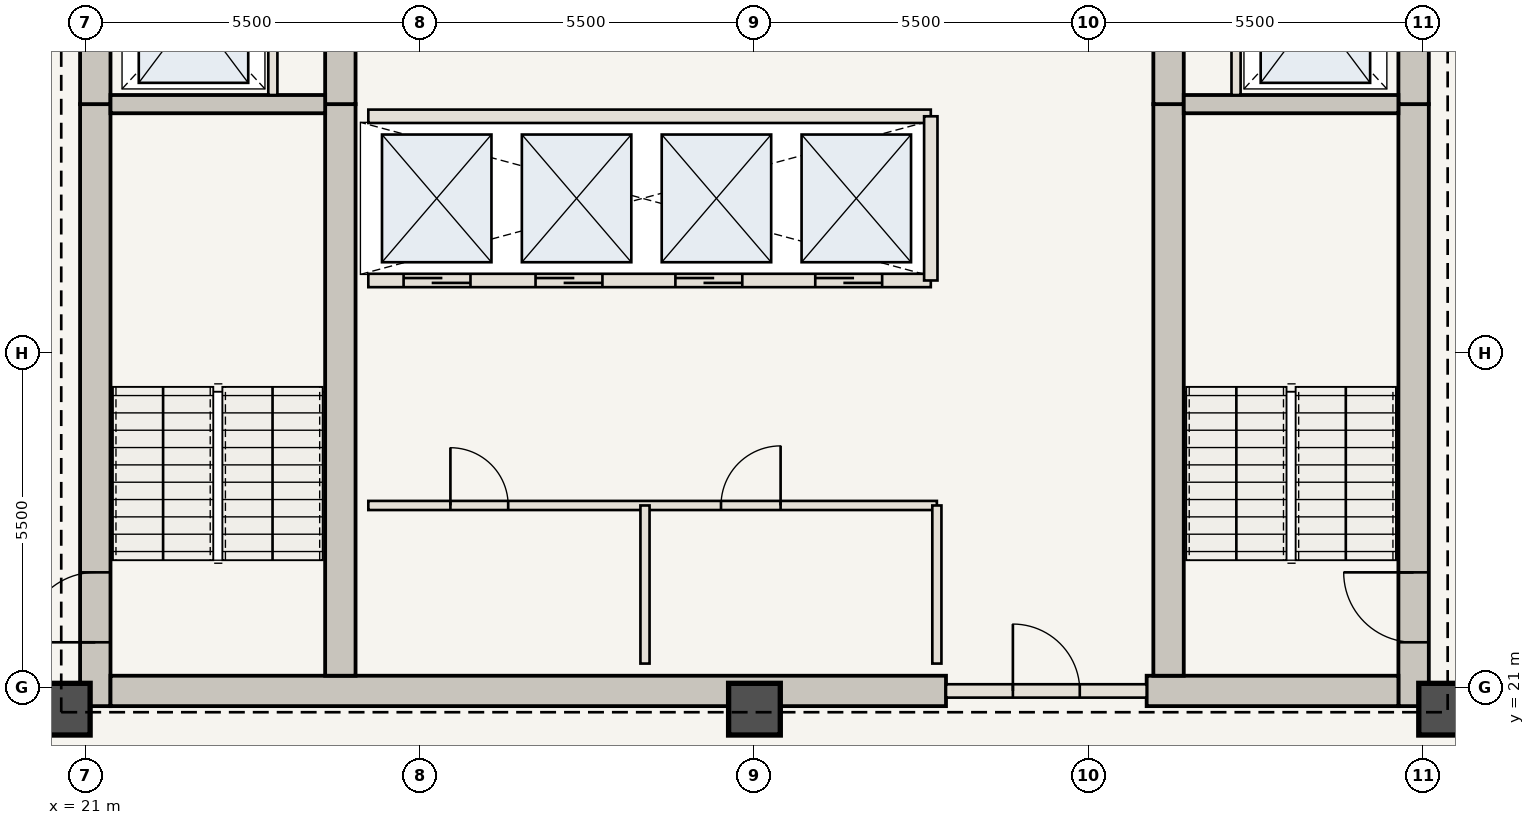
"""IFC4 building model, lengths in metres.
Left out: names, types, materials, properties, quantities, classifications, styles, units other than length and angle.
Written with IfcOpenShell. Run it as: python <this file> out.ifc"""

import sys

from ifc_helpers import new_model, si_unit, direction, frame, frame_2d, origin, origin_2d, place, context, subcontext, project, spatial, rectangle, extrude, element, fill, save


model = new_model("IFC4")
c1 = context("Model", 3, precision=1e-05, world=origin(), true_north=direction((0.0, 1.0)))
c2 = subcontext(c1, "Body", "Model", "MODEL_VIEW")
j1 = project(units=[si_unit("LENGTHUNIT", "METRE"), si_unit("PLANEANGLEUNIT", "RADIAN")], contexts=[c1])
p1 = place(None, origin())
s1 = spatial("IfcSite", under=j1, at=p1, CompositionType="ELEMENT")
p2 = place(p1, origin())
s2 = spatial("IfcBuilding", under=s1, at=p2, CompositionType="ELEMENT")
p3 = place(p2, frame((0.0, 0.0, 190.75)))
s3 = spatial("IfcBuildingStorey", under=s2, at=p3, CompositionType="ELEMENT", Elevation=190.75)
p4 = place(p3, frame((21.16, 20.7, 0.0), z_axis=(0.0, 0.0, 1.0), x_axis=(0.0, 1.0, 0.0)))
e1 = element("IfcWall", 1, at=p4, inside=s3, PredefinedType="SHEAR", context=c2, shape_type="SweptSolid", body=[
    extrude(rectangle(XDim=9.9, YDim=0.5, at=frame_2d((4.95, 0.0))), origin(), (0.0, 0.0, 1.0), 3.85),
])
p5 = place(p4, frame((1.05, 0.0, 0.0)))
e2 = element("IfcOpeningElement", 2, at=p5, cuts=e1, PredefinedType="OPENING", context=c2, shape_type="SweptSolid", body=[
    extrude(rectangle(XDim=1.15, YDim=2.15, at=frame_2d((0.575, 1.075))), frame((0.0, 0.26, 0.0), z_axis=(0.0, -1.0, 0.0), x_axis=(1.0, 0.0, 0.0)), (0.0, 0.0, 1.0), 0.52),
])
p6 = place(p3, frame((21.16, 30.6, 0.0), z_axis=(0.0, 0.0, 1.0), x_axis=(0.0, 1.0, 0.0)))
e3 = element("IfcWall", 3, at=p6, inside=s3, PredefinedType="SHEAR", context=c2, shape_type="SweptSolid", body=[
    extrude(rectangle(XDim=12.65, YDim=0.5, at=frame_2d((6.325, 0.0))), origin(), (0.0, 0.0, 1.0), 3.85),
])
p7 = place(p6, frame((4.2, 0.0, 0.0)))
e4 = element("IfcOpeningElement", 4, at=p7, cuts=e3, PredefinedType="OPENING", context=c2, shape_type="SweptSolid", body=[
    extrude(rectangle(XDim=1.1, YDim=2.15, at=frame_2d((0.55, 1.075))), frame((0.0, 0.26, 0.0), z_axis=(0.0, -1.0, 0.0), x_axis=(1.0, 0.0, 0.0)), (0.0, 0.0, 1.0), 0.52),
])
p8 = place(p6, frame((9.2, 0.0, 0.0)))
e5 = element("IfcOpeningElement", 5, at=p8, cuts=e3, PredefinedType="OPENING", context=c2, shape_type="SweptSolid", body=[
    extrude(rectangle(XDim=0.92, YDim=2.1, at=frame_2d((0.46, 1.05))), frame((0.0, 0.26, 0.0), z_axis=(0.0, -1.0, 0.0), x_axis=(1.0, 0.0, 0.0)), (0.0, 0.0, 1.0), 0.52),
])
p9 = place(p3, frame((42.84, 20.7, 0.0), z_axis=(0.0, 0.0, 1.0), x_axis=(0.0, 1.0, 0.0)))
e6 = element("IfcWall", 6, at=p9, inside=s3, PredefinedType="SHEAR", context=c2, shape_type="SweptSolid", body=[
    extrude(rectangle(XDim=9.9, YDim=0.5, at=frame_2d((4.95, 0.0))), origin(), (0.0, 0.0, 1.0), 3.85),
])
p10 = place(p9, frame((1.05, 0.0, 0.0)))
e7 = element("IfcOpeningElement", 7, at=p10, cuts=e6, PredefinedType="OPENING", context=c2, shape_type="SweptSolid", body=[
    extrude(rectangle(XDim=1.15, YDim=2.15, at=frame_2d((0.575, 1.075))), frame((0.0, 0.26, 0.0), z_axis=(0.0, -1.0, 0.0), x_axis=(1.0, 0.0, 0.0)), (0.0, 0.0, 1.0), 0.52),
])
p11 = place(p3, frame((42.84, 30.6, 0.0), z_axis=(0.0, 0.0, 1.0), x_axis=(0.0, 1.0, 0.0)))
e8 = element("IfcWall", 8, at=p11, inside=s3, PredefinedType="SHEAR", context=c2, shape_type="SweptSolid", body=[
    extrude(rectangle(XDim=12.65, YDim=0.5, at=frame_2d((6.325, 0.0))), origin(), (0.0, 0.0, 1.0), 3.85),
])
p12 = place(p11, frame((4.2, 0.0, 0.0)))
e9 = element("IfcOpeningElement", 9, at=p12, cuts=e8, PredefinedType="OPENING", context=c2, shape_type="SweptSolid", body=[
    extrude(rectangle(XDim=1.1, YDim=2.15, at=frame_2d((0.55, 1.075))), frame((0.0, 0.26, 0.0), z_axis=(0.0, -1.0, 0.0), x_axis=(1.0, 0.0, 0.0)), (0.0, 0.0, 1.0), 0.52),
])
p13 = place(p11, frame((8.4, 0.0, 0.0)))
e10 = element("IfcOpeningElement", 10, at=p13, cuts=e8, PredefinedType="OPENING", context=c2, shape_type="SweptSolid", body=[
    extrude(rectangle(XDim=0.88, YDim=2.1, at=frame_2d((0.44, 1.05))), frame((0.0, 0.26, 0.0), z_axis=(0.0, -1.0, 0.0), x_axis=(1.0, 0.0, 0.0)), (0.0, 0.0, 1.0), 0.52),
])
p14 = place(p11, frame((10.5, 0.0, 0.0)))
e11 = element("IfcOpeningElement", 11, at=p14, cuts=e8, PredefinedType="OPENING", context=c2, shape_type="SweptSolid", body=[
    extrude(rectangle(XDim=0.88, YDim=2.1, at=frame_2d((0.44, 1.05))), frame((0.0, 0.26, 0.0), z_axis=(0.0, -1.0, 0.0), x_axis=(1.0, 0.0, 0.0)), (0.0, 0.0, 1.0), 0.52),
])
p15 = place(p3, frame((21.41, 20.95, 0.0), z_axis=(0.0, 0.0, 1.0), x_axis=(1.0, 0.0, 0.0)))
e12 = element("IfcWall", 12, at=p15, inside=s3, PredefinedType="SHEAR", context=c2, shape_type="SweptSolid", body=[
    extrude(rectangle(XDim=13.74, YDim=0.5, at=frame_2d((6.87, 0.0))), origin(), (0.0, 0.0, 1.0), 3.85),
])
p16 = place(p3, frame((38.45, 20.95, 0.0), z_axis=(0.0, 0.0, 1.0), x_axis=(1.0, 0.0, 0.0)))
e13 = element("IfcWall", 13, at=p16, inside=s3, PredefinedType="SHEAR", context=c2, shape_type="SweptSolid", body=[
    extrude(rectangle(XDim=4.14, YDim=0.5, at=frame_2d((2.07, 0.0))), origin(), (0.0, 0.0, 1.0), 3.85),
])
p17 = place(p3, frame((25.19, 21.2, 0.0), z_axis=(0.0, 0.0, 1.0), x_axis=(0.0, 1.0, 0.0)))
e14 = element("IfcWall", 14, at=p17, inside=s3, PredefinedType="SHEAR", context=c2, shape_type="SweptSolid", body=[
    extrude(rectangle(XDim=9.4, YDim=0.5, at=frame_2d((4.7, 0.0))), origin(), (0.0, 0.0, 1.0), 3.85),
])
p18 = place(p3, frame((25.19, 30.6, 0.0), z_axis=(0.0, 0.0, 1.0), x_axis=(0.0, 1.0, 0.0)))
e15 = element("IfcWall", 15, at=p18, inside=s3, PredefinedType="SHEAR", context=c2, shape_type="SweptSolid", body=[
    extrude(rectangle(XDim=12.15, YDim=0.5, at=frame_2d((6.075, 0.0))), origin(), (0.0, 0.0, 1.0), 3.85),
])
p19 = place(p18, frame((6.25, 0.0, 0.0)))
e16 = element("IfcOpeningElement", 16, at=p19, cuts=e15, PredefinedType="OPENING", context=c2, shape_type="SweptSolid", body=[
    extrude(rectangle(XDim=1.1, YDim=2.15, at=frame_2d((0.55, 1.075))), frame((0.0, 0.26, 0.0), z_axis=(0.0, -1.0, 0.0), x_axis=(1.0, 0.0, 0.0)), (0.0, 0.0, 1.0), 0.52),
])
p20 = place(p3, frame((38.81, 21.2, 0.0), z_axis=(0.0, 0.0, 1.0), x_axis=(0.0, 1.0, 0.0)))
e17 = element("IfcWall", 17, at=p20, inside=s3, PredefinedType="SHEAR", context=c2, shape_type="SweptSolid", body=[
    extrude(rectangle(XDim=9.4, YDim=0.5, at=frame_2d((4.7, 0.0))), origin(), (0.0, 0.0, 1.0), 3.85),
])
p21 = place(p3, frame((38.81, 30.6, 0.0), z_axis=(0.0, 0.0, 1.0), x_axis=(0.0, 1.0, 0.0)))
e18 = element("IfcWall", 18, at=p21, inside=s3, PredefinedType="SHEAR", context=c2, shape_type="SweptSolid", body=[
    extrude(rectangle(XDim=12.15, YDim=0.5, at=frame_2d((6.075, 0.0))), origin(), (0.0, 0.0, 1.0), 3.85),
])
for number, where, z_axis, x_axis in (
    (19, (20.65, 20.65, 0.0), (0.0, 0.0, 1.0), (1.0, 0.0, 0.0)),
    (20, (32.0, 20.65, 0.0), (0.0, 0.0, 1.0), (1.0, 0.0, 0.0)),
    (21, (43.35, 20.65, 0.0), (0.0, 0.0, 1.0), (1.0, 0.0, 0.0)),
):
    element("IfcColumn", number, at=place(p3, frame(where, z_axis=z_axis, x_axis=x_axis)), inside=s3, PredefinedType="COLUMN", context=c2, shape_type="SweptSolid", body=[
        extrude(rectangle(XDim=0.85, YDim=0.85, at=origin_2d()), origin(), (0.0, 0.0, 1.0), 3.85),
    ])
for number, where, z_axis, x_axis in (
    (22, (21.41, 30.6, 0.0), (0.0, 0.0, 1.0), (1.0, 0.0, 0.0)),
    (23, (39.06, 30.6, 0.0), (0.0, 0.0, 1.0), (1.0, 0.0, 0.0)),
):
    element("IfcWall", number, at=place(p3, frame(where, z_axis=z_axis, x_axis=x_axis)), inside=s3, PredefinedType="SHEAR", context=c2, shape_type="SweptSolid", body=[
        extrude(rectangle(XDim=3.53, YDim=0.3, at=frame_2d((1.765, 0.0))), origin(), (0.0, 0.0, 1.0), 3.685),
    ])
for number, where, z_axis, x_axis in (
    (24, (24.08, 30.75, 0.0), (0.0, 0.0, 1.0), (0.0, 1.0, 0.0)),
    (25, (39.92, 30.75, 0.0), (0.0, 0.0, 1.0), (0.0, 1.0, 0.0)),
):
    element("IfcWall", number, at=place(p3, frame(where, z_axis=z_axis, x_axis=x_axis)), inside=s3, PredefinedType="STANDARD", context=c2, shape_type="SweptSolid", body=[
        extrude(rectangle(XDim=2.65, YDim=0.15, at=frame_2d((1.325, 0.0))), origin(), (0.0, 0.0, 1.0), 3.685),
    ])
p22 = place(p3, frame((35.15, 20.95, 0.0), z_axis=(0.0, 0.0, 1.0), x_axis=(1.0, 0.0, 0.0)))
e26 = element("IfcWall", 26, at=p22, inside=s3, PredefinedType="STANDARD", context=c2, shape_type="SweptSolid", body=[
    extrude(rectangle(XDim=3.3, YDim=0.22, at=frame_2d((1.65, 0.0))), origin(), (0.0, 0.0, 1.0), 3.685),
])
p23 = place(p22, frame((1.1, 0.0, 0.0)))
e27 = element("IfcOpeningElement", 27, at=p23, cuts=e26, PredefinedType="OPENING", context=c2, shape_type="SweptSolid", body=[
    extrude(rectangle(XDim=1.1, YDim=2.15, at=frame_2d((0.55, 1.075))), frame((0.0, 0.12, 0.0), z_axis=(0.0, -1.0, 0.0), x_axis=(1.0, 0.0, 0.0)), (0.0, 0.0, 1.0), 0.24),
])
p24 = place(p3, frame((25.65, 24.0, 0.0), z_axis=(0.0, 0.0, 1.0), x_axis=(1.0, 0.0, 0.0)))
e28 = element("IfcWall", 28, at=p24, inside=s3, PredefinedType="STANDARD", context=c2, shape_type="SweptSolid", body=[
    extrude(rectangle(XDim=9.35, YDim=0.15, at=frame_2d((4.675, 0.0))), origin(), (0.0, 0.0, 1.0), 3.685),
])
p25 = place(p24, frame((1.35, 0.0, 0.0)))
e29 = element("IfcOpeningElement", 29, at=p25, cuts=e28, PredefinedType="OPENING", context=c2, shape_type="SweptSolid", body=[
    extrude(rectangle(XDim=0.95, YDim=2.15, at=frame_2d((0.475, 1.075))), frame((0.0, 0.085, 0.0), z_axis=(0.0, -1.0, 0.0), x_axis=(1.0, 0.0, 0.0)), (0.0, 0.0, 1.0), 0.17),
])
p26 = place(p24, frame((5.8, 0.0, 0.0)))
e30 = element("IfcOpeningElement", 30, at=p26, cuts=e28, PredefinedType="OPENING", context=c2, shape_type="SweptSolid", body=[
    extrude(rectangle(XDim=0.98, YDim=2.2, at=frame_2d((0.49, 1.1))), frame((0.0, 0.085, 0.0), z_axis=(0.0, -1.0, 0.0), x_axis=(1.0, 0.0, 0.0)), (0.0, 0.0, 1.0), 0.17),
])
for number, where, z_axis, x_axis in (
    (31, (30.2, 21.4, 0.0), (0.0, 0.0, 1.0), (0.0, 1.0, 0.0)),
    (32, (35.0, 21.4, 0.0), (0.0, 0.0, 1.0), (0.0, 1.0, 0.0)),
):
    element("IfcWall", number, at=place(p3, frame(where, z_axis=z_axis, x_axis=x_axis)), inside=s3, PredefinedType="STANDARD", context=c2, shape_type="SweptSolid", body=[
        extrude(rectangle(XDim=2.6, YDim=0.15, at=frame_2d((1.3, 0.0))), origin(), (0.0, 0.0, 1.0), 3.685),
    ])
p27 = place(p3, frame((25.65, 27.7, 0.0), z_axis=(0.0, 0.0, 1.0), x_axis=(1.0, 0.0, 0.0)))
e33 = element("IfcWall", 33, at=p27, inside=s3, PredefinedType="STANDARD", context=c2, shape_type="SweptSolid", body=[
    extrude(rectangle(XDim=9.25, YDim=0.22, at=frame_2d((4.625, 0.0))), origin(), (0.0, 0.0, 1.0), 3.685),
])
p28 = place(p27, frame((0.58, 0.0, 0.0)))
e34 = element("IfcOpeningElement", 34, at=p28, cuts=e33, PredefinedType="OPENING", context=c2, shape_type="SweptSolid", body=[
    extrude(rectangle(XDim=1.1, YDim=2.15, at=frame_2d((0.55, 1.075))), frame((0.0, 0.12, 0.0), z_axis=(0.0, -1.0, 0.0), x_axis=(1.0, 0.0, 0.0)), (0.0, 0.0, 1.0), 0.24),
])
p29 = place(p27, frame((2.75, 0.0, 0.0)))
e35 = element("IfcOpeningElement", 35, at=p29, cuts=e33, PredefinedType="OPENING", context=c2, shape_type="SweptSolid", body=[
    extrude(rectangle(XDim=1.1, YDim=2.15, at=frame_2d((0.55, 1.075))), frame((0.0, 0.12, 0.0), z_axis=(0.0, -1.0, 0.0), x_axis=(1.0, 0.0, 0.0)), (0.0, 0.0, 1.0), 0.24),
])
p30 = place(p27, frame((5.05, 0.0, 0.0)))
e36 = element("IfcOpeningElement", 36, at=p30, cuts=e33, PredefinedType="OPENING", context=c2, shape_type="SweptSolid", body=[
    extrude(rectangle(XDim=1.1, YDim=2.15, at=frame_2d((0.55, 1.075))), frame((0.0, 0.12, 0.0), z_axis=(0.0, -1.0, 0.0), x_axis=(1.0, 0.0, 0.0)), (0.0, 0.0, 1.0), 0.24),
])
p31 = place(p27, frame((7.35, 0.0, 0.0)))
e37 = element("IfcOpeningElement", 37, at=p31, cuts=e33, PredefinedType="OPENING", context=c2, shape_type="SweptSolid", body=[
    extrude(rectangle(XDim=1.1, YDim=2.15, at=frame_2d((0.55, 1.075))), frame((0.0, 0.12, 0.0), z_axis=(0.0, -1.0, 0.0), x_axis=(1.0, 0.0, 0.0)), (0.0, 0.0, 1.0), 0.24),
])
p32 = place(p3, frame((25.65, 30.4, 0.0), z_axis=(0.0, 0.0, 1.0), x_axis=(1.0, 0.0, 0.0)))
e38 = element("IfcWall", 38, at=p32, inside=s3, PredefinedType="STANDARD", context=c2, shape_type="SweptSolid", body=[
    extrude(rectangle(XDim=9.25, YDim=0.22, at=frame_2d((4.625, 0.0))), origin(), (0.0, 0.0, 1.0), 3.685),
])
p33 = place(p3, frame((34.9, 27.7, 0.0), z_axis=(0.0, 0.0, 1.0), x_axis=(0.0, 1.0, 0.0)))
e39 = element("IfcWall", 39, at=p33, inside=s3, PredefinedType="STANDARD", context=c2, shape_type="SweptSolid", body=[
    extrude(rectangle(XDim=2.7, YDim=0.22, at=frame_2d((1.35, 0.0))), origin(), (0.0, 0.0, 1.0), 3.685),
])
p34 = place(p5, origin())
e40 = element("IfcDoor", 40, at=p34, inside=s3, OperationType="SINGLE_SWING_LEFT", PredefinedType="DOOR", context=c2, shape_type="SweptSolid", body=[
    extrude(rectangle(XDim=1.15, YDim=2.15, at=frame_2d((0.575, 1.075))), frame((0.0, 0.025, 0.0), z_axis=(0.0, -1.0, 0.0), x_axis=(1.0, 0.0, 0.0)), (0.0, 0.0, 1.0), 0.05),
])
fill(e2, e40)
p35 = place(p10, origin())
e41 = element("IfcDoor", 41, at=p35, inside=s3, OperationType="SINGLE_SWING_RIGHT", PredefinedType="DOOR", context=c2, shape_type="SweptSolid", body=[
    extrude(rectangle(XDim=1.15, YDim=2.15, at=frame_2d((0.575, 1.075))), frame((0.0, 0.025, 0.0), z_axis=(0.0, -1.0, 0.0), x_axis=(1.0, 0.0, 0.0)), (0.0, 0.0, 1.0), 0.05),
])
fill(e7, e41)
p36 = place(p23, origin())
e42 = element("IfcDoor", 42, at=p36, inside=s3, OperationType="SINGLE_SWING_LEFT", PredefinedType="DOOR", context=c2, shape_type="SweptSolid", body=[
    extrude(rectangle(XDim=1.1, YDim=2.15, at=frame_2d((0.55, 1.075))), frame((0.0, 0.025, 0.0), z_axis=(0.0, -1.0, 0.0), x_axis=(1.0, 0.0, 0.0)), (0.0, 0.0, 1.0), 0.05),
])
fill(e27, e42)
p37 = place(p25, origin())
e43 = element("IfcDoor", 43, at=p37, inside=s3, OperationType="SINGLE_SWING_LEFT", PredefinedType="DOOR", context=c2, shape_type="SweptSolid", body=[
    extrude(rectangle(XDim=0.95, YDim=2.15, at=frame_2d((0.475, 1.075))), frame((0.0, 0.025, 0.0), z_axis=(0.0, -1.0, 0.0), x_axis=(1.0, 0.0, 0.0)), (0.0, 0.0, 1.0), 0.05),
])
fill(e29, e43)
p38 = place(p26, origin())
e44 = element("IfcDoor", 44, at=p38, inside=s3, OperationType="SINGLE_SWING_RIGHT", PredefinedType="DOOR", context=c2, shape_type="SweptSolid", body=[
    extrude(rectangle(XDim=0.98, YDim=2.2, at=frame_2d((0.49, 1.1))), frame((0.0, 0.025, 0.0), z_axis=(0.0, -1.0, 0.0), x_axis=(1.0, 0.0, 0.0)), (0.0, 0.0, 1.0), 0.05),
])
fill(e30, e44)
p39 = place(p28, origin())
e45 = element("IfcDoor", 45, at=p39, inside=s3, OperationType="DOUBLE_DOOR_SLIDING", PredefinedType="DOOR", context=c2, shape_type="SweptSolid", body=[
    extrude(rectangle(XDim=1.1, YDim=2.15, at=frame_2d((0.55, 1.075))), frame((0.0, 0.025, 0.0), z_axis=(0.0, -1.0, 0.0), x_axis=(1.0, 0.0, 0.0)), (0.0, 0.0, 1.0), 0.05),
])
fill(e34, e45)
p40 = place(p29, origin())
e46 = element("IfcDoor", 46, at=p40, inside=s3, OperationType="DOUBLE_DOOR_SLIDING", PredefinedType="DOOR", context=c2, shape_type="SweptSolid", body=[
    extrude(rectangle(XDim=1.1, YDim=2.15, at=frame_2d((0.55, 1.075))), frame((0.0, 0.025, 0.0), z_axis=(0.0, -1.0, 0.0), x_axis=(1.0, 0.0, 0.0)), (0.0, 0.0, 1.0), 0.05),
])
fill(e35, e46)
p41 = place(p30, origin())
e47 = element("IfcDoor", 47, at=p41, inside=s3, OperationType="DOUBLE_DOOR_SLIDING", PredefinedType="DOOR", context=c2, shape_type="SweptSolid", body=[
    extrude(rectangle(XDim=1.1, YDim=2.15, at=frame_2d((0.55, 1.075))), frame((0.0, 0.025, 0.0), z_axis=(0.0, -1.0, 0.0), x_axis=(1.0, 0.0, 0.0)), (0.0, 0.0, 1.0), 0.05),
])
fill(e36, e47)
p42 = place(p31, origin())
e48 = element("IfcDoor", 48, at=p42, inside=s3, OperationType="DOUBLE_DOOR_SLIDING", PredefinedType="DOOR", context=c2, shape_type="SweptSolid", body=[
    extrude(rectangle(XDim=1.1, YDim=2.15, at=frame_2d((0.55, 1.075))), frame((0.0, 0.025, 0.0), z_axis=(0.0, -1.0, 0.0), x_axis=(1.0, 0.0, 0.0)), (0.0, 0.0, 1.0), 0.05),
])
fill(e37, e48)
save(model, sys.argv[1])
